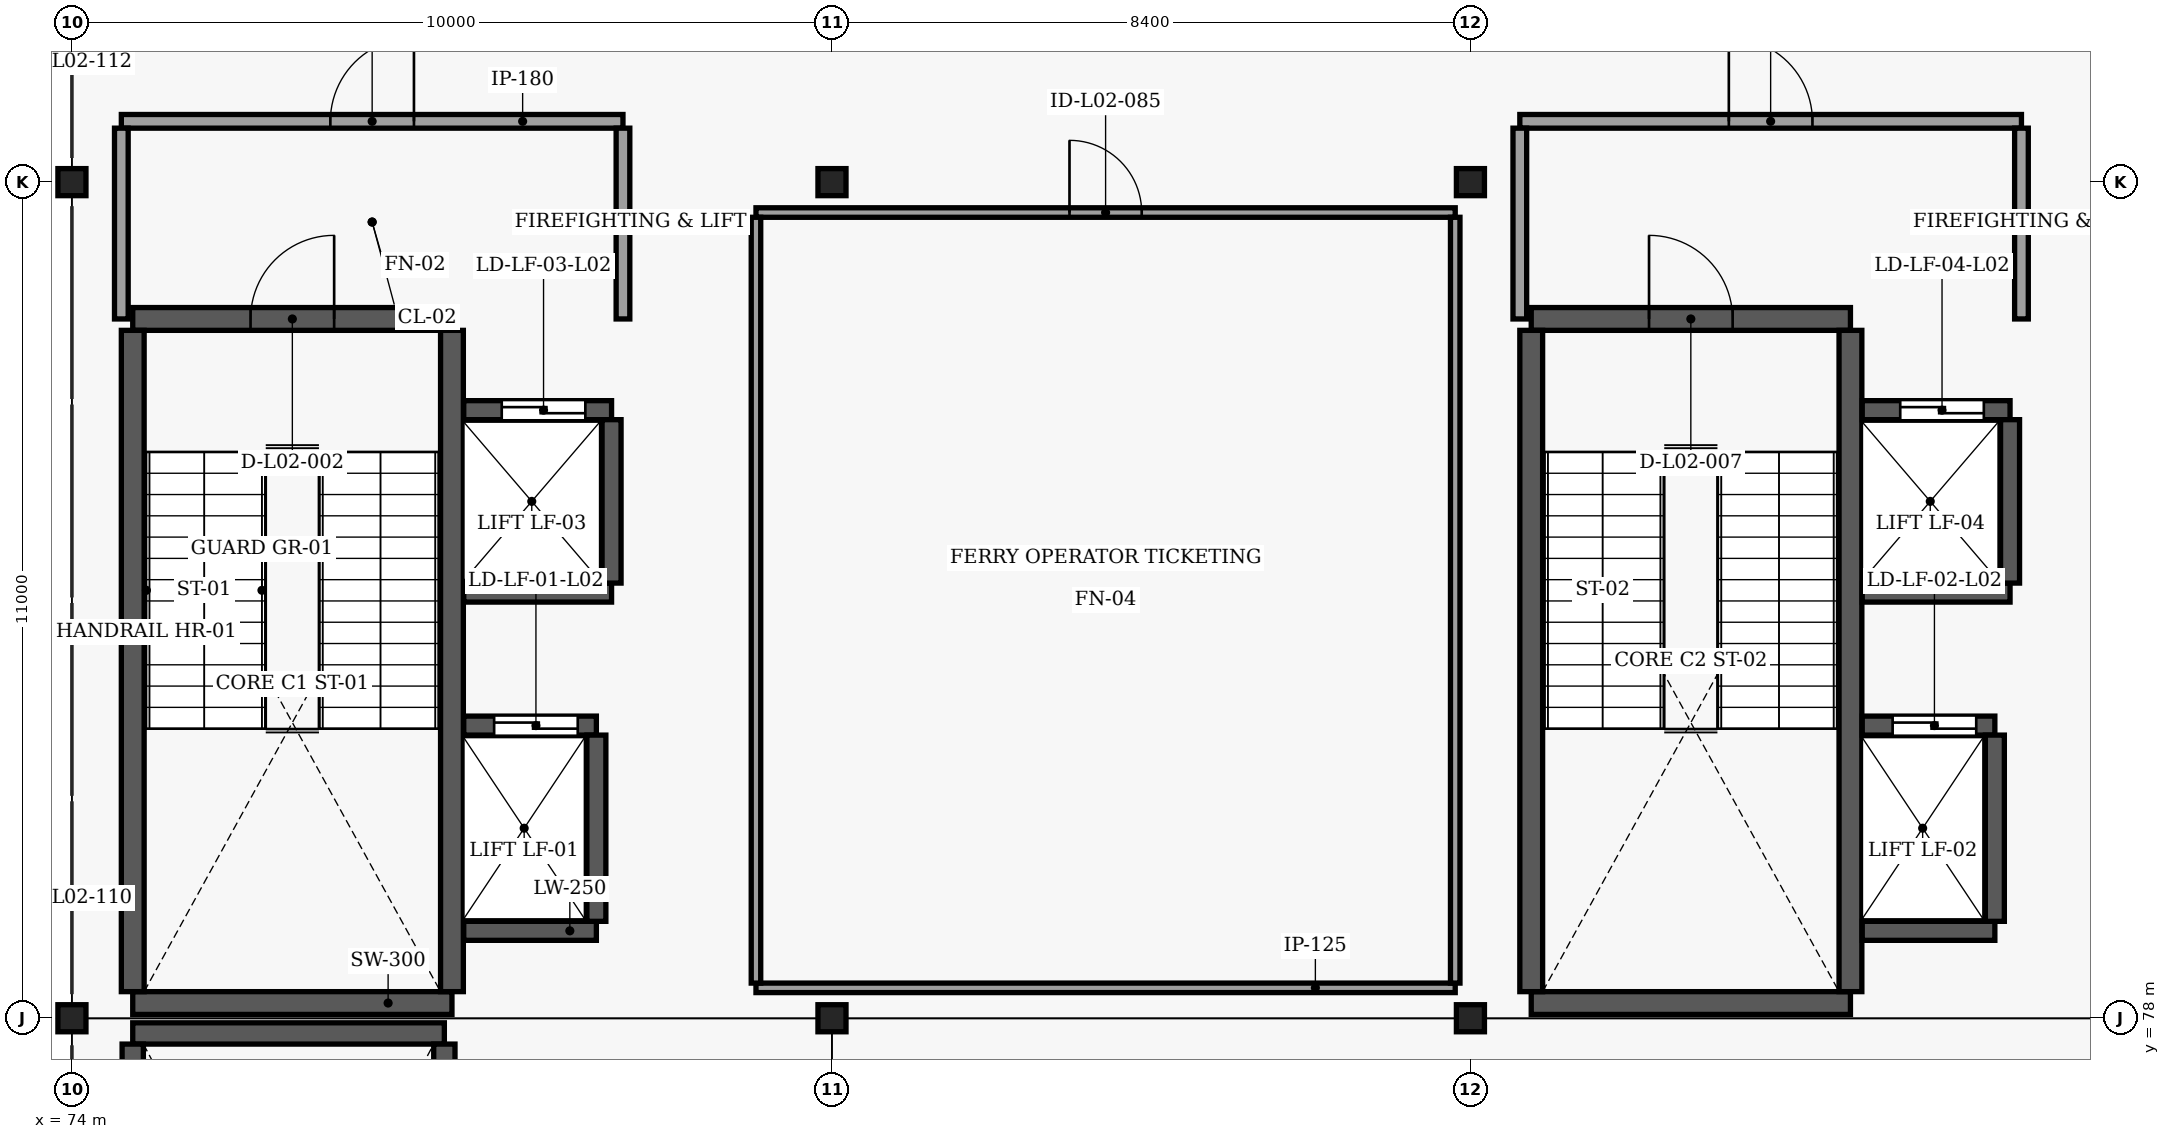
"""IFC4 building model, lengths in metres.
Left out: names, types, materials, properties, quantities, classifications, styles, units other than length and angle.
Written with IfcOpenShell. Run it as: python <this file> out.ifc"""

import sys

from ifc_helpers import new_model, si_unit, direction, frame, frame_2d, origin, origin_2d, place, context, subcontext, project, spatial, rectangle, i_section, extrude, element, fill, save


model = new_model("IFC4")
c1 = context("Model", 3, precision=1e-05, world=origin(), true_north=direction((0.0, 1.0)))
c2 = subcontext(c1, "Body", "Model", "MODEL_VIEW")
j1 = project(units=[si_unit("LENGTHUNIT", "METRE"), si_unit("PLANEANGLEUNIT", "RADIAN")], contexts=[c1])
p1 = place(None, origin())
s1 = spatial("IfcSite", under=j1, at=p1, CompositionType="ELEMENT")
p2 = place(p1, origin())
s2 = spatial("IfcBuilding", under=s1, at=p2, CompositionType="ELEMENT")
p3 = place(p2, frame((0.0, 0.0, 5.4)))
s3 = spatial("IfcBuildingStorey", under=s2, at=p3, CompositionType="ELEMENT", Elevation=5.4)
for number, where, z_axis, x_axis in (
    (1, (74.0, 78.0, 0.0), (0.0, 0.0, 1.0), (1.0, 0.0, 0.0)),
    (2, (84.0, 78.0, 0.0), (0.0, 0.0, 1.0), (1.0, 0.0, 0.0)),
    (3, (92.4, 78.0, 0.0), (0.0, 0.0, 1.0), (1.0, 0.0, 0.0)),
    (4, (74.0, 89.0, 0.0), (0.0, 0.0, 1.0), (1.0, 0.0, 0.0)),
    (5, (84.0, 89.0, 0.0), (0.0, 0.0, 1.0), (1.0, 0.0, 0.0)),
    (6, (92.4, 89.0, 0.0), (0.0, 0.0, 1.0), (1.0, 0.0, 0.0)),
):
    element("IfcColumn", number, at=place(p3, frame(where, z_axis=z_axis, x_axis=x_axis)), inside=s3, PredefinedType="COLUMN", context=c2, shape_type="SweptSolid", body=[
        extrude(i_section(OverallWidth=0.369, OverallDepth=0.356, WebThickness=0.011, FlangeThickness=0.018, FilletRadius=0.015, at=origin_2d()), origin(), (0.0, 0.0, 1.0), 4.5),
    ])
p4 = place(p3, frame((74.8, 78.2, 0.0), z_axis=(0.0, 0.0, 1.0), x_axis=(1.0, 0.0, 0.0)))
e7 = element("IfcWall", 7, at=p4, inside=s3, PredefinedType="SHEAR", context=c2, shape_type="SweptSolid", body=[
    extrude(rectangle(XDim=4.2, YDim=0.3, at=frame_2d((2.1, 0.0))), origin(), (0.0, 0.0, 1.0), 4.5),
])
p5 = place(p3, frame((74.8, 87.2, 0.0), z_axis=(0.0, 0.0, 1.0), x_axis=(1.0, 0.0, 0.0)))
e8 = element("IfcWall", 8, at=p5, inside=s3, PredefinedType="SHEAR", context=c2, shape_type="SweptSolid", body=[
    extrude(rectangle(XDim=4.2, YDim=0.3, at=frame_2d((2.1, 0.0))), origin(), (0.0, 0.0, 1.0), 4.5),
])
p6 = place(p5, frame((1.55, 0.0, 0.0)))
e9 = element("IfcOpeningElement", 9, at=p6, cuts=e8, PredefinedType="OPENING", context=c2, shape_type="SweptSolid", body=[
    extrude(rectangle(XDim=1.1, YDim=2.2, at=frame_2d((0.55, 1.1))), frame((0.0, 0.16, 0.0), z_axis=(0.0, -1.0, 0.0), x_axis=(1.0, 0.0, 0.0)), (0.0, 0.0, 1.0), 0.32),
])
for number, where, z_axis, x_axis in (
    (10, (74.8, 78.35, 0.0), (0.0, 0.0, 1.0), (0.0, 1.0, 0.0)),
    (11, (79.0, 78.35, 0.0), (0.0, 0.0, 1.0), (0.0, 1.0, 0.0)),
):
    element("IfcWall", number, at=place(p3, frame(where, z_axis=z_axis, x_axis=x_axis)), inside=s3, PredefinedType="SHEAR", context=c2, shape_type="SweptSolid", body=[
        extrude(rectangle(XDim=8.7, YDim=0.3, at=frame_2d((4.35, 0.0))), origin(), (0.0, 0.0, 1.0), 4.5),
    ])
p7 = place(p3, frame((79.155, 79.15, 0.0), z_axis=(0.0, 0.0, 1.0), x_axis=(1.0, 0.0, 0.0)))
e12 = element("IfcWall", 12, at=p7, inside=s3, PredefinedType="SOLIDWALL", context=c2, shape_type="SweptSolid", body=[
    extrude(rectangle(XDim=1.745, YDim=0.25, at=frame_2d((0.873, 0.0))), origin(), (0.0, 0.0, 1.0), 4.5),
])
p8 = place(p3, frame((79.155, 81.85, 0.0), z_axis=(0.0, 0.0, 1.0), x_axis=(1.0, 0.0, 0.0)))
e13 = element("IfcWall", 13, at=p8, inside=s3, PredefinedType="SOLIDWALL", context=c2, shape_type="SweptSolid", body=[
    extrude(rectangle(XDim=1.745, YDim=0.25, at=frame_2d((0.873, 0.0))), origin(), (0.0, 0.0, 1.0), 4.5),
])
p9 = place(p8, frame((0.4, 0.0, 0.0)))
e14 = element("IfcOpeningElement", 14, at=p9, cuts=e13, PredefinedType="OPENING", context=c2, shape_type="SweptSolid", body=[
    extrude(rectangle(XDim=1.1, YDim=2.2, at=frame_2d((0.55, 1.1))), frame((0.0, 0.135, 0.0), z_axis=(0.0, -1.0, 0.0), x_axis=(1.0, 0.0, 0.0)), (0.0, 0.0, 1.0), 0.27),
])
p10 = place(p3, frame((80.9, 79.275, 0.0), z_axis=(0.0, 0.0, 1.0), x_axis=(0.0, 1.0, 0.0)))
e15 = element("IfcWall", 15, at=p10, inside=s3, PredefinedType="SOLIDWALL", context=c2, shape_type="SweptSolid", body=[
    extrude(rectangle(XDim=2.45, YDim=0.25, at=frame_2d((1.225, 0.0))), origin(), (0.0, 0.0, 1.0), 4.5),
])
p11 = place(p3, frame((79.155, 83.6, 0.0), z_axis=(0.0, 0.0, 1.0), x_axis=(1.0, 0.0, 0.0)))
e16 = element("IfcWall", 16, at=p11, inside=s3, PredefinedType="SOLIDWALL", context=c2, shape_type="SweptSolid", body=[
    extrude(rectangle(XDim=1.945, YDim=0.25, at=frame_2d((0.973, 0.0))), origin(), (0.0, 0.0, 1.0), 4.5),
])
p12 = place(p3, frame((79.155, 86.0, 0.0), z_axis=(0.0, 0.0, 1.0), x_axis=(1.0, 0.0, 0.0)))
e17 = element("IfcWall", 17, at=p12, inside=s3, PredefinedType="SOLIDWALL", context=c2, shape_type="SweptSolid", body=[
    extrude(rectangle(XDim=1.945, YDim=0.25, at=frame_2d((0.973, 0.0))), origin(), (0.0, 0.0, 1.0), 4.5),
])
p13 = place(p12, frame((0.5, 0.0, 0.0)))
e18 = element("IfcOpeningElement", 18, at=p13, cuts=e17, PredefinedType="OPENING", context=c2, shape_type="SweptSolid", body=[
    extrude(rectangle(XDim=1.1, YDim=2.2, at=frame_2d((0.55, 1.1))), frame((0.0, 0.135, 0.0), z_axis=(0.0, -1.0, 0.0), x_axis=(1.0, 0.0, 0.0)), (0.0, 0.0, 1.0), 0.27),
])
p14 = place(p3, frame((81.1, 83.725, 0.0), z_axis=(0.0, 0.0, 1.0), x_axis=(0.0, 1.0, 0.0)))
e19 = element("IfcWall", 19, at=p14, inside=s3, PredefinedType="SOLIDWALL", context=c2, shape_type="SweptSolid", body=[
    extrude(rectangle(XDim=2.15, YDim=0.25, at=frame_2d((1.075, 0.0))), origin(), (0.0, 0.0, 1.0), 4.5),
])
p15 = place(p3, frame((93.2, 78.2, 0.0), z_axis=(0.0, 0.0, 1.0), x_axis=(1.0, 0.0, 0.0)))
e20 = element("IfcWall", 20, at=p15, inside=s3, PredefinedType="SHEAR", context=c2, shape_type="SweptSolid", body=[
    extrude(rectangle(XDim=4.2, YDim=0.3, at=frame_2d((2.1, 0.0))), origin(), (0.0, 0.0, 1.0), 4.5),
])
p16 = place(p3, frame((93.2, 87.2, 0.0), z_axis=(0.0, 0.0, 1.0), x_axis=(1.0, 0.0, 0.0)))
e21 = element("IfcWall", 21, at=p16, inside=s3, PredefinedType="SHEAR", context=c2, shape_type="SweptSolid", body=[
    extrude(rectangle(XDim=4.2, YDim=0.3, at=frame_2d((2.1, 0.0))), origin(), (0.0, 0.0, 1.0), 4.5),
])
p17 = place(p16, frame((1.55, 0.0, 0.0)))
e22 = element("IfcOpeningElement", 22, at=p17, cuts=e21, PredefinedType="OPENING", context=c2, shape_type="SweptSolid", body=[
    extrude(rectangle(XDim=1.1, YDim=2.2, at=frame_2d((0.55, 1.1))), frame((0.0, 0.16, 0.0), z_axis=(0.0, -1.0, 0.0), x_axis=(1.0, 0.0, 0.0)), (0.0, 0.0, 1.0), 0.32),
])
for number, where, z_axis, x_axis in (
    (23, (93.2, 78.35, 0.0), (0.0, 0.0, 1.0), (0.0, 1.0, 0.0)),
    (24, (97.4, 78.35, 0.0), (0.0, 0.0, 1.0), (0.0, 1.0, 0.0)),
):
    element("IfcWall", number, at=place(p3, frame(where, z_axis=z_axis, x_axis=x_axis)), inside=s3, PredefinedType="SHEAR", context=c2, shape_type="SweptSolid", body=[
        extrude(rectangle(XDim=8.7, YDim=0.3, at=frame_2d((4.35, 0.0))), origin(), (0.0, 0.0, 1.0), 4.5),
    ])
p18 = place(p3, frame((97.555, 79.15, 0.0), z_axis=(0.0, 0.0, 1.0), x_axis=(1.0, 0.0, 0.0)))
e25 = element("IfcWall", 25, at=p18, inside=s3, PredefinedType="SOLIDWALL", context=c2, shape_type="SweptSolid", body=[
    extrude(rectangle(XDim=1.745, YDim=0.25, at=frame_2d((0.873, 0.0))), origin(), (0.0, 0.0, 1.0), 4.5),
])
p19 = place(p3, frame((97.555, 81.85, 0.0), z_axis=(0.0, 0.0, 1.0), x_axis=(1.0, 0.0, 0.0)))
e26 = element("IfcWall", 26, at=p19, inside=s3, PredefinedType="SOLIDWALL", context=c2, shape_type="SweptSolid", body=[
    extrude(rectangle(XDim=1.745, YDim=0.25, at=frame_2d((0.873, 0.0))), origin(), (0.0, 0.0, 1.0), 4.5),
])
p20 = place(p19, frame((0.4, 0.0, 0.0)))
e27 = element("IfcOpeningElement", 27, at=p20, cuts=e26, PredefinedType="OPENING", context=c2, shape_type="SweptSolid", body=[
    extrude(rectangle(XDim=1.1, YDim=2.2, at=frame_2d((0.55, 1.1))), frame((0.0, 0.135, 0.0), z_axis=(0.0, -1.0, 0.0), x_axis=(1.0, 0.0, 0.0)), (0.0, 0.0, 1.0), 0.27),
])
p21 = place(p3, frame((99.3, 79.275, 0.0), z_axis=(0.0, 0.0, 1.0), x_axis=(0.0, 1.0, 0.0)))
e28 = element("IfcWall", 28, at=p21, inside=s3, PredefinedType="SOLIDWALL", context=c2, shape_type="SweptSolid", body=[
    extrude(rectangle(XDim=2.45, YDim=0.25, at=frame_2d((1.225, 0.0))), origin(), (0.0, 0.0, 1.0), 4.5),
])
p22 = place(p3, frame((97.555, 83.6, 0.0), z_axis=(0.0, 0.0, 1.0), x_axis=(1.0, 0.0, 0.0)))
e29 = element("IfcWall", 29, at=p22, inside=s3, PredefinedType="SOLIDWALL", context=c2, shape_type="SweptSolid", body=[
    extrude(rectangle(XDim=1.945, YDim=0.25, at=frame_2d((0.973, 0.0))), origin(), (0.0, 0.0, 1.0), 4.5),
])
p23 = place(p3, frame((97.555, 86.0, 0.0), z_axis=(0.0, 0.0, 1.0), x_axis=(1.0, 0.0, 0.0)))
e30 = element("IfcWall", 30, at=p23, inside=s3, PredefinedType="SOLIDWALL", context=c2, shape_type="SweptSolid", body=[
    extrude(rectangle(XDim=1.945, YDim=0.25, at=frame_2d((0.973, 0.0))), origin(), (0.0, 0.0, 1.0), 4.5),
])
p24 = place(p23, frame((0.5, 0.0, 0.0)))
e31 = element("IfcOpeningElement", 31, at=p24, cuts=e30, PredefinedType="OPENING", context=c2, shape_type="SweptSolid", body=[
    extrude(rectangle(XDim=1.1, YDim=2.2, at=frame_2d((0.55, 1.1))), frame((0.0, 0.135, 0.0), z_axis=(0.0, -1.0, 0.0), x_axis=(1.0, 0.0, 0.0)), (0.0, 0.0, 1.0), 0.27),
])
p25 = place(p3, frame((99.5, 83.725, 0.0), z_axis=(0.0, 0.0, 1.0), x_axis=(0.0, 1.0, 0.0)))
e32 = element("IfcWall", 32, at=p25, inside=s3, PredefinedType="SOLIDWALL", context=c2, shape_type="SweptSolid", body=[
    extrude(rectangle(XDim=2.15, YDim=0.25, at=frame_2d((1.075, 0.0))), origin(), (0.0, 0.0, 1.0), 4.5),
])
p26 = place(p3, frame((74.8, 77.8, 0.0), z_axis=(0.0, 0.0, 1.0), x_axis=(1.0, 0.0, 0.0)))
e33 = element("IfcWall", 33, at=p26, inside=s3, PredefinedType="SHEAR", context=c2, shape_type="SweptSolid", body=[
    extrude(rectangle(XDim=4.1, YDim=0.28, at=frame_2d((2.05, 0.0))), origin(), (0.0, 0.0, 1.0), 4.5),
])
for number, where, z_axis, x_axis in (
    (34, (74.8, 68.94, 0.0), (0.0, 0.0, 1.0), (0.0, 1.0, 0.0)),
    (35, (78.9, 68.94, 0.0), (0.0, 0.0, 1.0), (0.0, 1.0, 0.0)),
):
    element("IfcWall", number, at=place(p3, frame(where, z_axis=z_axis, x_axis=x_axis)), inside=s3, PredefinedType="SHEAR", context=c2, shape_type="SweptSolid", body=[
        extrude(rectangle(XDim=8.72, YDim=0.28, at=frame_2d((4.36, 0.0))), origin(), (0.0, 0.0, 1.0), 4.5),
    ])
p27 = place(p3, frame((74.65, 89.8, 0.0), z_axis=(0.0, 0.0, 1.0), x_axis=(1.0, 0.0, 0.0)))
e36 = element("IfcWall", 36, at=p27, inside=s3, PredefinedType="SOLIDWALL", context=c2, shape_type="SweptSolid", body=[
    extrude(rectangle(XDim=6.6, YDim=0.18, at=frame_2d((3.3, 0.0))), origin(), (0.0, 0.0, 1.0), 4.5),
])
p28 = place(p27, frame((2.75, 0.0, 0.0)))
e37 = element("IfcOpeningElement", 37, at=p28, cuts=e36, PredefinedType="OPENING", context=c2, shape_type="SweptSolid", body=[
    extrude(rectangle(XDim=1.1, YDim=2.2, at=frame_2d((0.55, 1.1))), frame((0.0, 0.1, 0.0), z_axis=(0.0, -1.0, 0.0), x_axis=(1.0, 0.0, 0.0)), (0.0, 0.0, 1.0), 0.2),
])
for number, where, z_axis, x_axis in (
    (38, (74.65, 87.2, 0.0), (0.0, 0.0, 1.0), (0.0, 1.0, 0.0)),
    (39, (81.25, 87.2, 0.0), (0.0, 0.0, 1.0), (0.0, 1.0, 0.0)),
):
    element("IfcWall", number, at=place(p3, frame(where, z_axis=z_axis, x_axis=x_axis)), inside=s3, PredefinedType="SOLIDWALL", context=c2, shape_type="SweptSolid", body=[
        extrude(rectangle(XDim=2.51, YDim=0.18, at=frame_2d((1.255, 0.0))), origin(), (0.0, 0.0, 1.0), 4.04),
    ])
p29 = place(p3, frame((93.05, 89.8, 0.0), z_axis=(0.0, 0.0, 1.0), x_axis=(1.0, 0.0, 0.0)))
e40 = element("IfcWall", 40, at=p29, inside=s3, PredefinedType="SOLIDWALL", context=c2, shape_type="SweptSolid", body=[
    extrude(rectangle(XDim=6.6, YDim=0.18, at=frame_2d((3.3, 0.0))), origin(), (0.0, 0.0, 1.0), 4.5),
])
p30 = place(p29, frame((2.75, 0.0, 0.0)))
e41 = element("IfcOpeningElement", 41, at=p30, cuts=e40, PredefinedType="OPENING", context=c2, shape_type="SweptSolid", body=[
    extrude(rectangle(XDim=1.1, YDim=2.2, at=frame_2d((0.55, 1.1))), frame((0.0, 0.1, 0.0), z_axis=(0.0, -1.0, 0.0), x_axis=(1.0, 0.0, 0.0)), (0.0, 0.0, 1.0), 0.2),
])
for number, where, z_axis, x_axis in (
    (42, (93.05, 87.2, 0.0), (0.0, 0.0, 1.0), (0.0, 1.0, 0.0)),
    (43, (99.65, 87.2, 0.0), (0.0, 0.0, 1.0), (0.0, 1.0, 0.0)),
):
    element("IfcWall", number, at=place(p3, frame(where, z_axis=z_axis, x_axis=x_axis)), inside=s3, PredefinedType="SOLIDWALL", context=c2, shape_type="SweptSolid", body=[
        extrude(rectangle(XDim=2.51, YDim=0.18, at=frame_2d((1.255, 0.0))), origin(), (0.0, 0.0, 1.0), 4.04),
    ])
p31 = place(p3, frame((83.0, 78.4, 0.0), z_axis=(0.0, 0.0, 1.0), x_axis=(1.0, 0.0, 0.0)))
e44 = element("IfcWall", 44, at=p31, inside=s3, PredefinedType="PARTITIONING", context=c2, shape_type="SweptSolid", body=[
    extrude(rectangle(XDim=9.2, YDim=0.125, at=frame_2d((4.6, 0.0))), origin(), (0.0, 0.0, 1.0), 4.083),
])
p32 = place(p3, frame((83.0, 88.6, 0.0), z_axis=(0.0, 0.0, 1.0), x_axis=(1.0, 0.0, 0.0)))
e45 = element("IfcWall", 45, at=p32, inside=s3, PredefinedType="PARTITIONING", context=c2, shape_type="SweptSolid", body=[
    extrude(rectangle(XDim=9.2, YDim=0.125, at=frame_2d((4.6, 0.0))), origin(), (0.0, 0.0, 1.0), 4.083),
])
p33 = place(p32, frame((4.125, 0.0, 0.0)))
e46 = element("IfcOpeningElement", 46, at=p33, cuts=e45, PredefinedType="OPENING", context=c2, shape_type="SweptSolid", body=[
    extrude(rectangle(XDim=0.95, YDim=2.15, at=frame_2d((0.475, 1.075))), frame((0.0, 0.073, 0.0), z_axis=(0.0, -1.0, 0.0), x_axis=(1.0, 0.0, 0.0)), (0.0, 0.0, 1.0), 0.145),
])
p34 = place(p3, frame((83.0, 78.462, 0.0), z_axis=(0.0, 0.0, 1.0), x_axis=(0.0, 1.0, 0.0)))
e47 = element("IfcWall", 47, at=p34, inside=s3, PredefinedType="PARTITIONING", context=c2, shape_type="SweptSolid", body=[
    extrude(rectangle(XDim=10.075, YDim=0.125, at=frame_2d((5.038, 0.0))), origin(), (0.0, 0.0, 1.0), 4.5),
])
p35 = place(p3, frame((92.2, 78.462, 0.0), z_axis=(0.0, 0.0, 1.0), x_axis=(0.0, 1.0, 0.0)))
e48 = element("IfcWall", 48, at=p35, inside=s3, PredefinedType="PARTITIONING", context=c2, shape_type="SweptSolid", body=[
    extrude(rectangle(XDim=10.075, YDim=0.125, at=frame_2d((5.038, 0.0))), origin(), (0.0, 0.0, 1.0), 4.083),
])
p36 = place(p6, origin())
e49 = element("IfcDoor", 49, at=p36, inside=s3, OperationType="SINGLE_SWING_RIGHT", PredefinedType="DOOR", context=c2, shape_type="SweptSolid", body=[
    extrude(rectangle(XDim=1.1, YDim=2.2, at=frame_2d((0.55, 1.1))), frame((0.0, 0.025, 0.0), z_axis=(0.0, -1.0, 0.0), x_axis=(1.0, 0.0, 0.0)), (0.0, 0.0, 1.0), 0.05),
])
fill(e9, e49)
p37 = place(p9, origin())
e50 = element("IfcDoor", 50, at=p37, inside=s3, OperationType="SLIDING_TO_LEFT", PredefinedType="DOOR", context=c2, shape_type="SweptSolid", body=[
    extrude(rectangle(XDim=1.1, YDim=2.2, at=frame_2d((0.55, 1.1))), frame((0.0, 0.025, 0.0), z_axis=(0.0, -1.0, 0.0), x_axis=(1.0, 0.0, 0.0)), (0.0, 0.0, 1.0), 0.05),
])
fill(e14, e50)
p38 = place(p13, origin())
e51 = element("IfcDoor", 51, at=p38, inside=s3, OperationType="SLIDING_TO_LEFT", PredefinedType="DOOR", context=c2, shape_type="SweptSolid", body=[
    extrude(rectangle(XDim=1.1, YDim=2.2, at=frame_2d((0.55, 1.1))), frame((0.0, 0.025, 0.0), z_axis=(0.0, -1.0, 0.0), x_axis=(1.0, 0.0, 0.0)), (0.0, 0.0, 1.0), 0.05),
])
fill(e18, e51)
p39 = place(p17, origin())
e52 = element("IfcDoor", 52, at=p39, inside=s3, OperationType="SINGLE_SWING_LEFT", PredefinedType="DOOR", context=c2, shape_type="SweptSolid", body=[
    extrude(rectangle(XDim=1.1, YDim=2.2, at=frame_2d((0.55, 1.1))), frame((0.0, 0.025, 0.0), z_axis=(0.0, -1.0, 0.0), x_axis=(1.0, 0.0, 0.0)), (0.0, 0.0, 1.0), 0.05),
])
fill(e22, e52)
p40 = place(p20, origin())
e53 = element("IfcDoor", 53, at=p40, inside=s3, OperationType="SLIDING_TO_LEFT", PredefinedType="DOOR", context=c2, shape_type="SweptSolid", body=[
    extrude(rectangle(XDim=1.1, YDim=2.2, at=frame_2d((0.55, 1.1))), frame((0.0, 0.025, 0.0), z_axis=(0.0, -1.0, 0.0), x_axis=(1.0, 0.0, 0.0)), (0.0, 0.0, 1.0), 0.05),
])
fill(e27, e53)
p41 = place(p24, origin())
e54 = element("IfcDoor", 54, at=p41, inside=s3, OperationType="SLIDING_TO_LEFT", PredefinedType="DOOR", context=c2, shape_type="SweptSolid", body=[
    extrude(rectangle(XDim=1.1, YDim=2.2, at=frame_2d((0.55, 1.1))), frame((0.0, 0.025, 0.0), z_axis=(0.0, -1.0, 0.0), x_axis=(1.0, 0.0, 0.0)), (0.0, 0.0, 1.0), 0.05),
])
fill(e31, e54)
p42 = place(p28, origin())
e55 = element("IfcDoor", 55, at=p42, inside=s3, OperationType="SINGLE_SWING_RIGHT", PredefinedType="DOOR", context=c2, shape_type="SweptSolid", body=[
    extrude(rectangle(XDim=1.1, YDim=2.2, at=frame_2d((0.55, 1.1))), frame((0.0, 0.025, 0.0), z_axis=(0.0, -1.0, 0.0), x_axis=(1.0, 0.0, 0.0)), (0.0, 0.0, 1.0), 0.05),
])
fill(e37, e55)
p43 = place(p30, origin())
e56 = element("IfcDoor", 56, at=p43, inside=s3, OperationType="SINGLE_SWING_LEFT", PredefinedType="DOOR", context=c2, shape_type="SweptSolid", body=[
    extrude(rectangle(XDim=1.1, YDim=2.2, at=frame_2d((0.55, 1.1))), frame((0.0, 0.025, 0.0), z_axis=(0.0, -1.0, 0.0), x_axis=(1.0, 0.0, 0.0)), (0.0, 0.0, 1.0), 0.05),
])
fill(e41, e56)
p44 = place(p33, origin())
e57 = element("IfcDoor", 57, at=p44, inside=s3, OperationType="SINGLE_SWING_LEFT", PredefinedType="DOOR", context=c2, shape_type="SweptSolid", body=[
    extrude(rectangle(XDim=0.95, YDim=2.15, at=frame_2d((0.475, 1.075))), frame((0.0, 0.025, 0.0), z_axis=(0.0, -1.0, 0.0), x_axis=(1.0, 0.0, 0.0)), (0.0, 0.0, 1.0), 0.05),
])
fill(e46, e57)
save(model, sys.argv[1])
